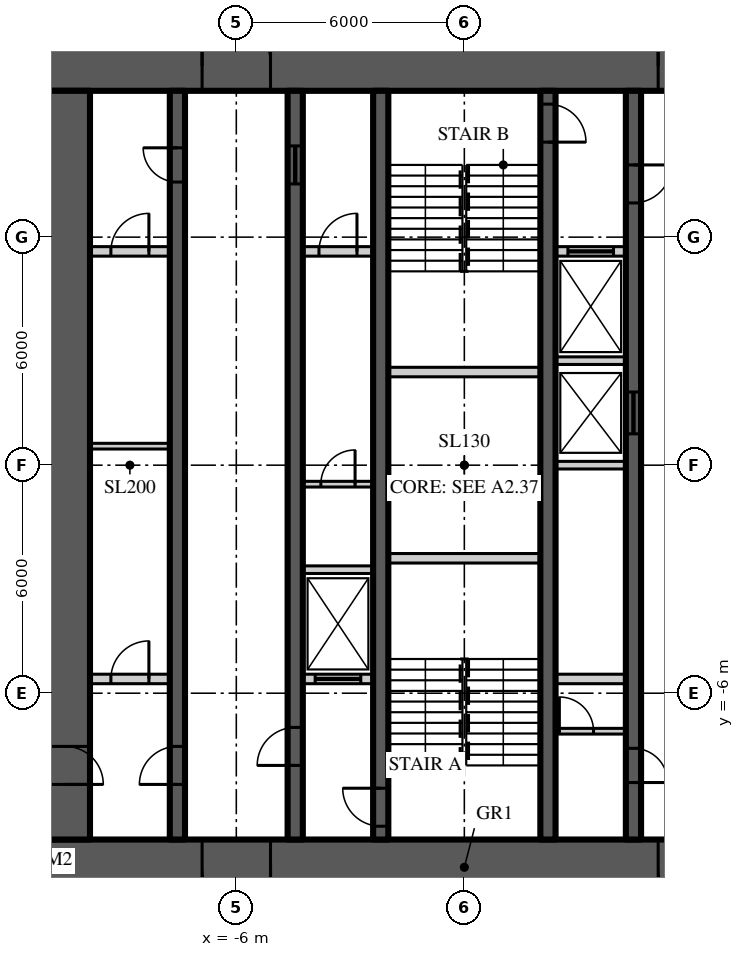
"""IFC4 building model, lengths in metres.
Left out: names, types, materials, properties, quantities, classifications, styles, units other than length and angle.
Written with IfcOpenShell. Run it as: python <this file> out.ifc"""

import sys

from ifc_helpers import new_model, si_unit, direction, frame, frame_2d, origin, place, context, subcontext, project, spatial, rectangle, extrude, element, fill, save


model = new_model("IFC4")
c1 = context("Model", 3, precision=1e-05, world=origin(), true_north=direction((0.0, 1.0)))
c2 = subcontext(c1, "Body", "Model", "MODEL_VIEW")
j1 = project(units=[si_unit("LENGTHUNIT", "METRE"), si_unit("PLANEANGLEUNIT", "RADIAN")], contexts=[c1])
p1 = place(None, origin())
s1 = spatial("IfcSite", under=j1, at=p1, CompositionType="ELEMENT")
p2 = place(p1, origin())
s2 = spatial("IfcBuilding", under=s1, at=p2, CompositionType="ELEMENT")
p3 = place(p2, frame((0.0, 0.0, 294.6)))
s3 = spatial("IfcBuildingStorey", under=s2, at=p3, CompositionType="ELEMENT", Elevation=294.6)
p4 = place(p3, frame((-11.15, 10.5, 0.0), z_axis=(0.0, 0.0, 1.0), x_axis=(1.0, 0.0, 0.0)))
e1 = element("IfcWall", 1, at=p4, inside=s3, PredefinedType="SHEAR", context=c2, shape_type="SweptSolid", body=[
    extrude(rectangle(XDim=22.3, YDim=1.3, at=frame_2d((11.15, 0.0))), origin(), (0.0, 0.0, 1.0), 3.9),
])
p5 = place(p4, frame((4.25, 0.0, 0.0)))
e2 = element("IfcOpeningElement", 2, at=p5, cuts=e1, PredefinedType="OPENING", context=c2, shape_type="SweptSolid", body=[
    extrude(rectangle(XDim=1.8, YDim=2.2, at=frame_2d((0.9, 1.1))), frame((0.0, 0.66, 0.0), z_axis=(0.0, -1.0, 0.0), x_axis=(1.0, 0.0, 0.0)), (0.0, 0.0, 1.0), 1.32),
])
p6 = place(p4, frame((16.25, 0.0, 0.0)))
e3 = element("IfcOpeningElement", 3, at=p6, cuts=e1, PredefinedType="OPENING", context=c2, shape_type="SweptSolid", body=[
    extrude(rectangle(XDim=1.8, YDim=2.2, at=frame_2d((0.9, 1.1))), frame((0.0, 0.66, 0.0), z_axis=(0.0, -1.0, 0.0), x_axis=(1.0, 0.0, 0.0)), (0.0, 0.0, 1.0), 1.32),
])
p7 = place(p3, frame((11.15, -10.5, 0.0), z_axis=(0.0, 0.0, 1.0), x_axis=(-1.0, 0.0, 0.0)))
e4 = element("IfcWall", 4, at=p7, inside=s3, PredefinedType="SHEAR", context=c2, shape_type="SweptSolid", body=[
    extrude(rectangle(XDim=22.3, YDim=1.3, at=frame_2d((11.15, 0.0))), origin(), (0.0, 0.0, 1.0), 3.9),
])
p8 = place(p7, frame((16.25, 0.0, 0.0)))
e5 = element("IfcOpeningElement", 5, at=p8, cuts=e4, PredefinedType="OPENING", context=c2, shape_type="SweptSolid", body=[
    extrude(rectangle(XDim=1.8, YDim=2.2, at=frame_2d((0.9, 1.1))), frame((0.0, 0.66, 0.0), z_axis=(0.0, -1.0, 0.0), x_axis=(1.0, 0.0, 0.0)), (0.0, 0.0, 1.0), 1.32),
])
p9 = place(p7, frame((4.25, 0.0, 0.0)))
e6 = element("IfcOpeningElement", 6, at=p9, cuts=e4, PredefinedType="OPENING", context=c2, shape_type="SweptSolid", body=[
    extrude(rectangle(XDim=1.8, YDim=2.2, at=frame_2d((0.9, 1.1))), frame((0.0, 0.66, 0.0), z_axis=(0.0, -1.0, 0.0), x_axis=(1.0, 0.0, 0.0)), (0.0, 0.0, 1.0), 1.32),
])
p10 = place(p3, frame((-10.5, 9.85, 0.0), z_axis=(0.0, 0.0, 1.0), x_axis=(0.0, -1.0, 0.0)))
e7 = element("IfcWall", 7, at=p10, inside=s3, PredefinedType="SHEAR", context=c2, shape_type="SweptSolid", body=[
    extrude(rectangle(XDim=19.7, YDim=1.3, at=frame_2d((9.85, 0.0))), origin(), (0.0, 0.0, 1.0), 3.9),
])
p11 = place(p10, frame((17.25, 0.0, 0.0)))
e8 = element("IfcOpeningElement", 8, at=p11, cuts=e7, PredefinedType="OPENING", context=c2, shape_type="SweptSolid", body=[
    extrude(rectangle(XDim=1.0, YDim=2.2, at=frame_2d((0.5, 1.1))), frame((0.0, 0.66, 0.0), z_axis=(0.0, -1.0, 0.0), x_axis=(1.0, 0.0, 0.0)), (0.0, 0.0, 1.0), 1.32),
])
p12 = place(p3, frame((-7.55, -9.85, 0.0), z_axis=(0.0, 0.0, 1.0), x_axis=(0.0, 1.0, 0.0)))
e9 = element("IfcWall", 9, at=p12, inside=s3, PredefinedType="SHEAR", context=c2, shape_type="SweptSolid", body=[
    extrude(rectangle(XDim=19.7, YDim=0.4, at=frame_2d((9.85, 0.0))), origin(), (0.0, 0.0, 1.0), 3.9),
])
p13 = place(p12, frame((1.45, 0.0, 0.0)))
e10 = element("IfcOpeningElement", 10, at=p13, cuts=e9, PredefinedType="OPENING", context=c2, shape_type="SweptSolid", body=[
    extrude(rectangle(XDim=1.0, YDim=2.2, at=frame_2d((0.5, 1.1))), frame((0.0, 0.21, 0.0), z_axis=(0.0, -1.0, 0.0), x_axis=(1.0, 0.0, 0.0)), (0.0, 0.0, 1.0), 0.42),
])
p14 = place(p12, frame((17.3, 0.0, 0.0)))
e11 = element("IfcOpeningElement", 11, at=p14, cuts=e9, PredefinedType="OPENING", context=c2, shape_type="SweptSolid", body=[
    extrude(rectangle(XDim=0.9, YDim=2.1, at=frame_2d((0.45, 1.05))), frame((0.0, 0.21, 0.0), z_axis=(0.0, -1.0, 0.0), x_axis=(1.0, 0.0, 0.0)), (0.0, 0.0, 1.0), 0.42),
])
p15 = place(p3, frame((-4.45, -9.85, 0.0), z_axis=(0.0, 0.0, 1.0), x_axis=(0.0, 1.0, 0.0)))
e12 = element("IfcWall", 12, at=p15, inside=s3, PredefinedType="SHEAR", context=c2, shape_type="SweptSolid", body=[
    extrude(rectangle(XDim=19.7, YDim=0.4, at=frame_2d((9.85, 0.0))), origin(), (0.0, 0.0, 1.0), 3.9),
])
p16 = place(p15, frame((1.95, 0.0, 0.0)))
e13 = element("IfcOpeningElement", 13, at=p16, cuts=e12, PredefinedType="OPENING", context=c2, shape_type="SweptSolid", body=[
    extrude(rectangle(XDim=1.0, YDim=2.2, at=frame_2d((0.5, 1.1))), frame((0.0, 0.21, 0.0), z_axis=(0.0, -1.0, 0.0), x_axis=(1.0, 0.0, 0.0)), (0.0, 0.0, 1.0), 0.42),
])
p17 = place(p15, frame((17.25, 0.0, 0.0)))
e14 = element("IfcOpeningElement", 14, at=p17, cuts=e12, PredefinedType="OPENING", context=c2, shape_type="SweptSolid", body=[
    extrude(rectangle(XDim=1.0, YDim=2.1, at=frame_2d((0.5, 1.05))), frame((0.0, 0.21, 0.0), z_axis=(0.0, -1.0, 0.0), x_axis=(1.0, 0.0, 0.0)), (0.0, 0.0, 1.0), 0.42),
])
p18 = place(p3, frame((4.45, 9.85, 0.0), z_axis=(0.0, 0.0, 1.0), x_axis=(0.0, -1.0, 0.0)))
e15 = element("IfcWall", 15, at=p18, inside=s3, PredefinedType="SHEAR", context=c2, shape_type="SweptSolid", body=[
    extrude(rectangle(XDim=19.7, YDim=0.4, at=frame_2d((9.85, 0.0))), origin(), (0.0, 0.0, 1.0), 3.9),
])
p19 = place(p18, frame((1.95, 0.0, 0.0)))
e16 = element("IfcOpeningElement", 16, at=p19, cuts=e15, PredefinedType="OPENING", context=c2, shape_type="SweptSolid", body=[
    extrude(rectangle(XDim=1.0, YDim=2.2, at=frame_2d((0.5, 1.1))), frame((0.0, 0.21, 0.0), z_axis=(0.0, -1.0, 0.0), x_axis=(1.0, 0.0, 0.0)), (0.0, 0.0, 1.0), 0.42),
])
p20 = place(p18, frame((17.3, 0.0, 0.0)))
e17 = element("IfcOpeningElement", 17, at=p20, cuts=e15, PredefinedType="OPENING", context=c2, shape_type="SweptSolid", body=[
    extrude(rectangle(XDim=0.9, YDim=2.1, at=frame_2d((0.45, 1.05))), frame((0.0, 0.21, 0.0), z_axis=(0.0, -1.0, 0.0), x_axis=(1.0, 0.0, 0.0)), (0.0, 0.0, 1.0), 0.42),
])
p21 = place(p18, frame((7.925, 0.0, 0.0)))
e18 = element("IfcOpeningElement", 18, at=p21, cuts=e15, PredefinedType="OPENING", context=c2, shape_type="SweptSolid", body=[
    extrude(rectangle(XDim=1.1, YDim=2.2, at=frame_2d((0.55, 1.1))), frame((0.0, 0.21, 0.0), z_axis=(0.0, -1.0, 0.0), x_axis=(1.0, 0.0, 0.0)), (0.0, 0.0, 1.0), 0.42),
])
p22 = place(p3, frame((-2.2, -9.85, 0.0), z_axis=(0.0, 0.0, 1.0), x_axis=(0.0, 1.0, 0.0)))
e19 = element("IfcWall", 19, at=p22, inside=s3, PredefinedType="SHEAR", context=c2, shape_type="SweptSolid", body=[
    extrude(rectangle(XDim=19.7, YDim=0.4, at=frame_2d((9.85, 0.0))), origin(), (0.0, 0.0, 1.0), 3.9),
])
p23 = place(p22, frame((0.35, 0.0, 0.0)))
e20 = element("IfcOpeningElement", 20, at=p23, cuts=e19, PredefinedType="OPENING", context=c2, shape_type="SweptSolid", body=[
    extrude(rectangle(XDim=1.0, YDim=2.2, at=frame_2d((0.5, 1.1))), frame((0.0, 0.21, 0.0), z_axis=(0.0, -1.0, 0.0), x_axis=(1.0, 0.0, 0.0)), (0.0, 0.0, 1.0), 0.42),
])
p24 = place(p3, frame((2.2, 9.85, 0.0), z_axis=(0.0, 0.0, 1.0), x_axis=(0.0, -1.0, 0.0)))
e21 = element("IfcWall", 21, at=p24, inside=s3, PredefinedType="SHEAR", context=c2, shape_type="SweptSolid", body=[
    extrude(rectangle(XDim=19.7, YDim=0.4, at=frame_2d((9.85, 0.0))), origin(), (0.0, 0.0, 1.0), 3.9),
])
p25 = place(p24, frame((0.35, 0.0, 0.0)))
e22 = element("IfcOpeningElement", 22, at=p25, cuts=e21, PredefinedType="OPENING", context=c2, shape_type="SweptSolid", body=[
    extrude(rectangle(XDim=1.0, YDim=2.2, at=frame_2d((0.5, 1.1))), frame((0.0, 0.21, 0.0), z_axis=(0.0, -1.0, 0.0), x_axis=(1.0, 0.0, 0.0)), (0.0, 0.0, 1.0), 0.42),
])
p26 = place(p3, frame((-9.85, 5.625, 0.0), z_axis=(0.0, 0.0, 1.0), x_axis=(1.0, 0.0, 0.0)))
e23 = element("IfcWall", 23, at=p26, inside=s3, PredefinedType="SOLIDWALL", context=c2, shape_type="SweptSolid", body=[
    extrude(rectangle(XDim=2.1, YDim=0.25, at=frame_2d((1.05, 0.0))), origin(), (0.0, 0.0, 1.0), 3.7),
])
p27 = place(p26, frame((0.55, 0.0, 0.0)))
e24 = element("IfcOpeningElement", 24, at=p27, cuts=e23, PredefinedType="OPENING", context=c2, shape_type="SweptSolid", body=[
    extrude(rectangle(XDim=1.0, YDim=2.2, at=frame_2d((0.5, 1.1))), frame((0.0, 0.135, 0.0), z_axis=(0.0, -1.0, 0.0), x_axis=(1.0, 0.0, 0.0)), (0.0, 0.0, 1.0), 0.27),
])
p28 = place(p3, frame((-4.25, 5.625, 0.0), z_axis=(0.0, 0.0, 1.0), x_axis=(1.0, 0.0, 0.0)))
e25 = element("IfcWall", 25, at=p28, inside=s3, PredefinedType="SOLIDWALL", context=c2, shape_type="SweptSolid", body=[
    extrude(rectangle(XDim=1.85, YDim=0.25, at=frame_2d((0.925, 0.0))), origin(), (0.0, 0.0, 1.0), 3.7),
])
p29 = place(p28, frame((0.425, 0.0, 0.0)))
e26 = element("IfcOpeningElement", 26, at=p29, cuts=e25, PredefinedType="OPENING", context=c2, shape_type="SweptSolid", body=[
    extrude(rectangle(XDim=1.0, YDim=2.2, at=frame_2d((0.5, 1.1))), frame((0.0, 0.135, 0.0), z_axis=(0.0, -1.0, 0.0), x_axis=(1.0, 0.0, 0.0)), (0.0, 0.0, 1.0), 0.27),
])
p30 = place(p3, frame((2.4, 5.625, 0.0), z_axis=(0.0, 0.0, 1.0), x_axis=(1.0, 0.0, 0.0)))
e27 = element("IfcWall", 27, at=p30, inside=s3, PredefinedType="SOLIDWALL", context=c2, shape_type="SweptSolid", body=[
    extrude(rectangle(XDim=1.85, YDim=0.25, at=frame_2d((0.925, 0.0))), origin(), (0.0, 0.0, 1.0), 3.7),
])
p31 = place(p30, frame((0.325, 0.0, 0.0)))
e28 = element("IfcOpeningElement", 28, at=p31, cuts=e27, PredefinedType="OPENING", context=c2, shape_type="SweptSolid", body=[
    extrude(rectangle(XDim=1.2, YDim=2.2, at=frame_2d((0.6, 1.1))), frame((0.0, 0.135, 0.0), z_axis=(0.0, -1.0, 0.0), x_axis=(1.0, 0.0, 0.0)), (0.0, 0.0, 1.0), 0.27),
])
p32 = place(p3, frame((-9.85, -5.625, 0.0), z_axis=(0.0, 0.0, 1.0), x_axis=(1.0, 0.0, 0.0)))
e29 = element("IfcWall", 29, at=p32, inside=s3, PredefinedType="SOLIDWALL", context=c2, shape_type="SweptSolid", body=[
    extrude(rectangle(XDim=2.1, YDim=0.25, at=frame_2d((1.05, 0.0))), origin(), (0.0, 0.0, 1.0), 3.7),
])
p33 = place(p32, frame((0.55, 0.0, 0.0)))
e30 = element("IfcOpeningElement", 30, at=p33, cuts=e29, PredefinedType="OPENING", context=c2, shape_type="SweptSolid", body=[
    extrude(rectangle(XDim=1.0, YDim=2.2, at=frame_2d((0.5, 1.1))), frame((0.0, 0.135, 0.0), z_axis=(0.0, -1.0, 0.0), x_axis=(1.0, 0.0, 0.0)), (0.0, 0.0, 1.0), 0.27),
])
p34 = place(p3, frame((-4.25, -5.625, 0.0), z_axis=(0.0, 0.0, 1.0), x_axis=(1.0, 0.0, 0.0)))
e31 = element("IfcWall", 31, at=p34, inside=s3, PredefinedType="SOLIDWALL", context=c2, shape_type="SweptSolid", body=[
    extrude(rectangle(XDim=1.85, YDim=0.25, at=frame_2d((0.925, 0.0))), origin(), (0.0, 0.0, 1.0), 3.7),
])
p35 = place(p34, frame((0.325, 0.0, 0.0)))
e32 = element("IfcOpeningElement", 32, at=p35, cuts=e31, PredefinedType="OPENING", context=c2, shape_type="SweptSolid", body=[
    extrude(rectangle(XDim=1.2, YDim=2.2, at=frame_2d((0.6, 1.1))), frame((0.0, 0.135, 0.0), z_axis=(0.0, -1.0, 0.0), x_axis=(1.0, 0.0, 0.0)), (0.0, 0.0, 1.0), 0.27),
])
p36 = place(p3, frame((2.4, -5.625, 0.0), z_axis=(0.0, 0.0, 1.0), x_axis=(1.0, 0.0, 0.0)))
e33 = element("IfcWall", 33, at=p36, inside=s3, PredefinedType="SOLIDWALL", context=c2, shape_type="SweptSolid", body=[
    extrude(rectangle(XDim=1.85, YDim=0.25, at=frame_2d((0.925, 0.0))), origin(), (0.0, 0.0, 1.0), 3.7),
])
for number, where, z_axis, x_axis in (
    (34, (-2.0, -2.45, 0.0), (0.0, 0.0, 1.0), (1.0, 0.0, 0.0)),
    (35, (-2.0, 2.45, 0.0), (0.0, 0.0, 1.0), (1.0, 0.0, 0.0)),
):
    element("IfcWall", number, at=place(p3, frame(where, z_axis=z_axis, x_axis=x_axis)), inside=s3, PredefinedType="SOLIDWALL", context=c2, shape_type="SweptSolid", body=[
        extrude(rectangle(XDim=4.0, YDim=0.25, at=frame_2d((2.0, 0.0))), origin(), (0.0, 0.0, 1.0), 3.7),
    ])
for number, where, z_axis, x_axis in (
    (36, (-4.25, -2.75, 0.0), (0.0, 0.0, 1.0), (1.0, 0.0, 0.0)),
    (37, (2.4, 0.0, 0.0), (0.0, 0.0, 1.0), (1.0, 0.0, 0.0)),
    (38, (2.4, 2.75, 0.0), (0.0, 0.0, 1.0), (1.0, 0.0, 0.0)),
):
    element("IfcWall", number, at=place(p3, frame(where, z_axis=z_axis, x_axis=x_axis)), inside=s3, PredefinedType="SOLIDWALL", context=c2, shape_type="SweptSolid", body=[
        extrude(rectangle(XDim=1.85, YDim=0.2, at=frame_2d((0.925, 0.0))), origin(), (0.0, 0.0, 1.0), 3.7),
    ])
p37 = place(p3, frame((-9.85, 0.5, 0.0), z_axis=(0.0, 0.0, 1.0), x_axis=(1.0, 0.0, 0.0)))
e39 = element("IfcWall", 39, at=p37, inside=s3, PredefinedType="SOLIDWALL", context=c2, shape_type="SweptSolid", body=[
    extrude(rectangle(XDim=2.1, YDim=0.15, at=frame_2d((1.05, 0.0))), origin(), (0.0, 0.0, 1.0), 3.77),
])
p38 = place(p3, frame((-4.25, -0.5, 0.0), z_axis=(0.0, 0.0, 1.0), x_axis=(1.0, 0.0, 0.0)))
e40 = element("IfcWall", 40, at=p38, inside=s3, PredefinedType="SOLIDWALL", context=c2, shape_type="SweptSolid", body=[
    extrude(rectangle(XDim=1.85, YDim=0.15, at=frame_2d((0.925, 0.0))), origin(), (0.0, 0.0, 1.0), 3.77),
])
p39 = place(p38, frame((0.475, 0.0, 0.0)))
e41 = element("IfcOpeningElement", 41, at=p39, cuts=e40, PredefinedType="OPENING", context=c2, shape_type="SweptSolid", body=[
    extrude(rectangle(XDim=0.9, YDim=2.1, at=frame_2d((0.45, 1.05))), frame((0.0, 0.085, 0.0), z_axis=(0.0, -1.0, 0.0), x_axis=(1.0, 0.0, 0.0)), (0.0, 0.0, 1.0), 0.17),
])
p40 = place(p3, frame((2.4, -7.0, 0.0), z_axis=(0.0, 0.0, 1.0), x_axis=(1.0, 0.0, 0.0)))
e42 = element("IfcWall", 42, at=p40, inside=s3, PredefinedType="SOLIDWALL", context=c2, shape_type="SweptSolid", body=[
    extrude(rectangle(XDim=1.85, YDim=0.15, at=frame_2d((0.925, 0.0))), origin(), (0.0, 0.0, 1.0), 3.77),
])
p41 = place(p40, frame((0.1, 0.0, 0.0)))
e43 = element("IfcOpeningElement", 43, at=p41, cuts=e42, PredefinedType="OPENING", context=c2, shape_type="SweptSolid", body=[
    extrude(rectangle(XDim=0.9, YDim=2.1, at=frame_2d((0.45, 1.05))), frame((0.0, 0.085, 0.0), z_axis=(0.0, -1.0, 0.0), x_axis=(1.0, 0.0, 0.0)), (0.0, 0.0, 1.0), 0.17),
])
p42 = place(p5, origin())
e44 = element("IfcDoor", 44, at=p42, inside=s3, OperationType="DOUBLE_DOOR_DOUBLE_SWING", PredefinedType="DOOR", context=c2, shape_type="SweptSolid", body=[
    extrude(rectangle(XDim=1.8, YDim=2.2, at=frame_2d((0.9, 1.1))), frame((0.0, 0.025, 0.0), z_axis=(0.0, -1.0, 0.0), x_axis=(1.0, 0.0, 0.0)), (0.0, 0.0, 1.0), 0.05),
])
fill(e2, e44)
p43 = place(p8, origin())
e45 = element("IfcDoor", 45, at=p43, inside=s3, OperationType="DOUBLE_DOOR_DOUBLE_SWING", PredefinedType="DOOR", context=c2, shape_type="SweptSolid", body=[
    extrude(rectangle(XDim=1.8, YDim=2.2, at=frame_2d((0.9, 1.1))), frame((0.0, 0.025, 0.0), z_axis=(0.0, -1.0, 0.0), x_axis=(1.0, 0.0, 0.0)), (0.0, 0.0, 1.0), 0.05),
])
fill(e5, e45)
p44 = place(p6, origin())
e46 = element("IfcDoor", 46, at=p44, inside=s3, OperationType="DOUBLE_DOOR_DOUBLE_SWING", PredefinedType="DOOR", context=c2, shape_type="SweptSolid", body=[
    extrude(rectangle(XDim=1.8, YDim=2.2, at=frame_2d((0.9, 1.1))), frame((0.0, 0.025, 0.0), z_axis=(0.0, -1.0, 0.0), x_axis=(1.0, 0.0, 0.0)), (0.0, 0.0, 1.0), 0.05),
])
fill(e3, e46)
p45 = place(p9, origin())
e47 = element("IfcDoor", 47, at=p45, inside=s3, OperationType="DOUBLE_DOOR_DOUBLE_SWING", PredefinedType="DOOR", context=c2, shape_type="SweptSolid", body=[
    extrude(rectangle(XDim=1.8, YDim=2.2, at=frame_2d((0.9, 1.1))), frame((0.0, 0.025, 0.0), z_axis=(0.0, -1.0, 0.0), x_axis=(1.0, 0.0, 0.0)), (0.0, 0.0, 1.0), 0.05),
])
fill(e6, e47)
p46 = place(p13, origin())
e48 = element("IfcDoor", 48, at=p46, inside=s3, OperationType="SINGLE_SWING_LEFT", PredefinedType="DOOR", context=c2, shape_type="SweptSolid", body=[
    extrude(rectangle(XDim=1.0, YDim=2.2, at=frame_2d((0.5, 1.1))), frame((0.0, 0.025, 0.0), z_axis=(0.0, -1.0, 0.0), x_axis=(1.0, 0.0, 0.0)), (0.0, 0.0, 1.0), 0.05),
])
fill(e10, e48)
p47 = place(p11, origin())
e49 = element("IfcDoor", 49, at=p47, inside=s3, OperationType="SINGLE_SWING_RIGHT", PredefinedType="DOOR", context=c2, shape_type="SweptSolid", body=[
    extrude(rectangle(XDim=1.0, YDim=2.2, at=frame_2d((0.5, 1.1))), frame((0.0, 0.025, 0.0), z_axis=(0.0, -1.0, 0.0), x_axis=(1.0, 0.0, 0.0)), (0.0, 0.0, 1.0), 0.05),
])
fill(e8, e49)
p48 = place(p16, origin())
e50 = element("IfcDoor", 50, at=p48, inside=s3, OperationType="SINGLE_SWING_LEFT", PredefinedType="DOOR", context=c2, shape_type="SweptSolid", body=[
    extrude(rectangle(XDim=1.0, YDim=2.2, at=frame_2d((0.5, 1.1))), frame((0.0, 0.025, 0.0), z_axis=(0.0, -1.0, 0.0), x_axis=(1.0, 0.0, 0.0)), (0.0, 0.0, 1.0), 0.05),
])
fill(e13, e50)
p49 = place(p23, origin())
e51 = element("IfcDoor", 51, at=p49, inside=s3, OperationType="SINGLE_SWING_RIGHT", PredefinedType="DOOR", context=c2, shape_type="SweptSolid", body=[
    extrude(rectangle(XDim=1.0, YDim=2.2, at=frame_2d((0.5, 1.1))), frame((0.0, 0.025, 0.0), z_axis=(0.0, -1.0, 0.0), x_axis=(1.0, 0.0, 0.0)), (0.0, 0.0, 1.0), 0.05),
])
fill(e20, e51)
p50 = place(p19, origin())
e52 = element("IfcDoor", 52, at=p50, inside=s3, OperationType="SINGLE_SWING_LEFT", PredefinedType="DOOR", context=c2, shape_type="SweptSolid", body=[
    extrude(rectangle(XDim=1.0, YDim=2.2, at=frame_2d((0.5, 1.1))), frame((0.0, 0.025, 0.0), z_axis=(0.0, -1.0, 0.0), x_axis=(1.0, 0.0, 0.0)), (0.0, 0.0, 1.0), 0.05),
])
fill(e16, e52)
p51 = place(p25, origin())
e53 = element("IfcDoor", 53, at=p51, inside=s3, OperationType="SINGLE_SWING_RIGHT", PredefinedType="DOOR", context=c2, shape_type="SweptSolid", body=[
    extrude(rectangle(XDim=1.0, YDim=2.2, at=frame_2d((0.5, 1.1))), frame((0.0, 0.025, 0.0), z_axis=(0.0, -1.0, 0.0), x_axis=(1.0, 0.0, 0.0)), (0.0, 0.0, 1.0), 0.05),
])
fill(e22, e53)
p52 = place(p14, origin())
e54 = element("IfcDoor", 54, at=p52, inside=s3, OperationType="SINGLE_SWING_RIGHT", PredefinedType="DOOR", context=c2, shape_type="SweptSolid", body=[
    extrude(rectangle(XDim=0.9, YDim=2.1, at=frame_2d((0.45, 1.05))), frame((0.0, 0.025, 0.0), z_axis=(0.0, -1.0, 0.0), x_axis=(1.0, 0.0, 0.0)), (0.0, 0.0, 1.0), 0.05),
])
fill(e11, e54)
p53 = place(p17, origin())
e55 = element("IfcDoor", 55, at=p53, inside=s3, OperationType="SLIDING_TO_LEFT", PredefinedType="DOOR", context=c2, shape_type="SweptSolid", body=[
    extrude(rectangle(XDim=1.0, YDim=2.1, at=frame_2d((0.5, 1.05))), frame((0.0, 0.025, 0.0), z_axis=(0.0, -1.0, 0.0), x_axis=(1.0, 0.0, 0.0)), (0.0, 0.0, 1.0), 0.05),
])
fill(e14, e55)
p54 = place(p20, origin())
e56 = element("IfcDoor", 56, at=p54, inside=s3, OperationType="SINGLE_SWING_RIGHT", PredefinedType="DOOR", context=c2, shape_type="SweptSolid", body=[
    extrude(rectangle(XDim=0.9, YDim=2.1, at=frame_2d((0.45, 1.05))), frame((0.0, 0.025, 0.0), z_axis=(0.0, -1.0, 0.0), x_axis=(1.0, 0.0, 0.0)), (0.0, 0.0, 1.0), 0.05),
])
fill(e17, e56)
p55 = place(p21, origin())
e57 = element("IfcDoor", 57, at=p55, inside=s3, OperationType="SLIDING_TO_LEFT", PredefinedType="DOOR", context=c2, shape_type="SweptSolid", body=[
    extrude(rectangle(XDim=1.1, YDim=2.2, at=frame_2d((0.55, 1.1))), frame((0.0, 0.025, 0.0), z_axis=(0.0, -1.0, 0.0), x_axis=(1.0, 0.0, 0.0)), (0.0, 0.0, 1.0), 0.05),
])
fill(e18, e57)
p56 = place(p35, origin())
e58 = element("IfcDoor", 58, at=p56, inside=s3, OperationType="SLIDING_TO_LEFT", PredefinedType="DOOR", context=c2, shape_type="SweptSolid", body=[
    extrude(rectangle(XDim=1.2, YDim=2.2, at=frame_2d((0.6, 1.1))), frame((0.0, 0.025, 0.0), z_axis=(0.0, -1.0, 0.0), x_axis=(1.0, 0.0, 0.0)), (0.0, 0.0, 1.0), 0.05),
])
fill(e32, e58)
p57 = place(p31, origin())
e59 = element("IfcDoor", 59, at=p57, inside=s3, OperationType="SLIDING_TO_LEFT", PredefinedType="DOOR", context=c2, shape_type="SweptSolid", body=[
    extrude(rectangle(XDim=1.2, YDim=2.2, at=frame_2d((0.6, 1.1))), frame((0.0, 0.025, 0.0), z_axis=(0.0, -1.0, 0.0), x_axis=(1.0, 0.0, 0.0)), (0.0, 0.0, 1.0), 0.05),
])
fill(e28, e59)
p58 = place(p27, origin())
e60 = element("IfcDoor", 60, at=p58, inside=s3, OperationType="SINGLE_SWING_RIGHT", PredefinedType="DOOR", context=c2, shape_type="SweptSolid", body=[
    extrude(rectangle(XDim=1.0, YDim=2.2, at=frame_2d((0.5, 1.1))), frame((0.0, 0.025, 0.0), z_axis=(0.0, -1.0, 0.0), x_axis=(1.0, 0.0, 0.0)), (0.0, 0.0, 1.0), 0.05),
])
fill(e24, e60)
p59 = place(p33, origin())
e61 = element("IfcDoor", 61, at=p59, inside=s3, OperationType="SINGLE_SWING_RIGHT", PredefinedType="DOOR", context=c2, shape_type="SweptSolid", body=[
    extrude(rectangle(XDim=1.0, YDim=2.2, at=frame_2d((0.5, 1.1))), frame((0.0, 0.025, 0.0), z_axis=(0.0, -1.0, 0.0), x_axis=(1.0, 0.0, 0.0)), (0.0, 0.0, 1.0), 0.05),
])
fill(e30, e61)
p60 = place(p39, origin())
e62 = element("IfcDoor", 62, at=p60, inside=s3, OperationType="SINGLE_SWING_RIGHT", PredefinedType="DOOR", context=c2, shape_type="SweptSolid", body=[
    extrude(rectangle(XDim=0.9, YDim=2.1, at=frame_2d((0.45, 1.05))), frame((0.0, 0.025, 0.0), z_axis=(0.0, -1.0, 0.0), x_axis=(1.0, 0.0, 0.0)), (0.0, 0.0, 1.0), 0.05),
])
fill(e41, e62)
p61 = place(p29, origin())
e63 = element("IfcDoor", 63, at=p61, inside=s3, OperationType="SINGLE_SWING_RIGHT", PredefinedType="DOOR", context=c2, shape_type="SweptSolid", body=[
    extrude(rectangle(XDim=1.0, YDim=2.2, at=frame_2d((0.5, 1.1))), frame((0.0, 0.025, 0.0), z_axis=(0.0, -1.0, 0.0), x_axis=(1.0, 0.0, 0.0)), (0.0, 0.0, 1.0), 0.05),
])
fill(e26, e63)
p62 = place(p41, origin())
e64 = element("IfcDoor", 64, at=p62, inside=s3, OperationType="SINGLE_SWING_LEFT", PredefinedType="DOOR", context=c2, shape_type="SweptSolid", body=[
    extrude(rectangle(XDim=0.9, YDim=2.1, at=frame_2d((0.45, 1.05))), frame((0.0, 0.025, 0.0), z_axis=(0.0, -1.0, 0.0), x_axis=(1.0, 0.0, 0.0)), (0.0, 0.0, 1.0), 0.05),
])
fill(e43, e64)
save(model, sys.argv[1])
